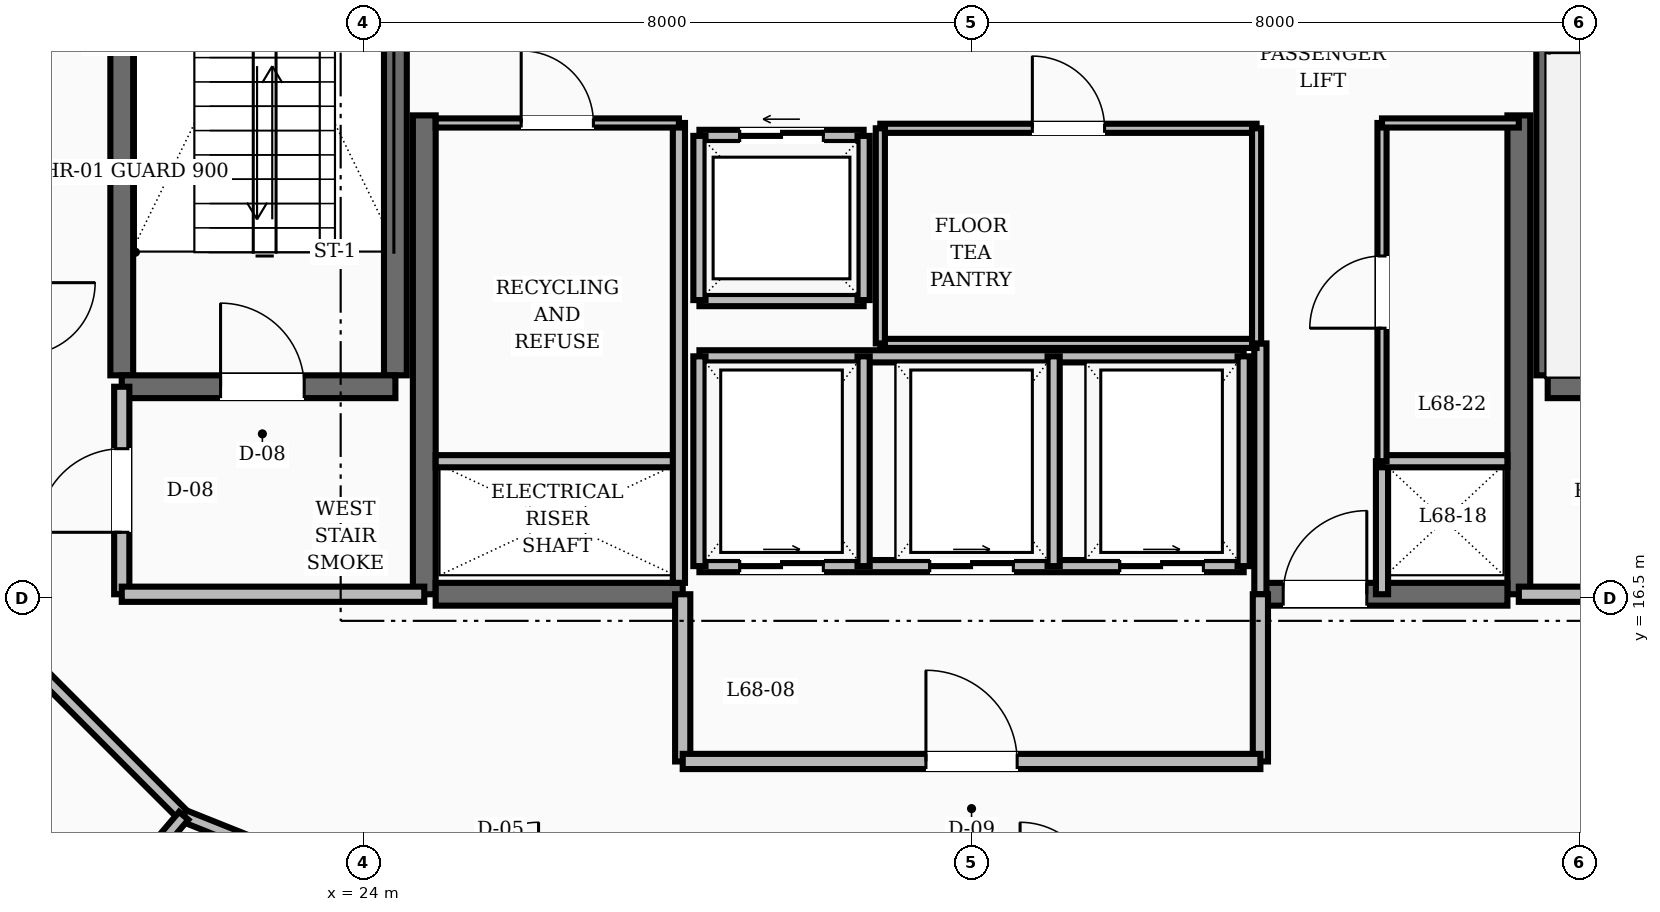
"""IFC4 building model, lengths in metres.
Left out: names, types, materials, properties, quantities, classifications, styles, units other than length and angle.
Written with IfcOpenShell. Run it as: python <this file> out.ifc"""

import sys

from ifc_helpers import new_model, si_unit, direction, frame, frame_2d, origin, place, context, subcontext, project, spatial, rectangle, extrude, element, fill, save


model = new_model("IFC4")
c1 = context("Model", 3, precision=1e-05, world=origin(), true_north=direction((0.0, 1.0)))
c2 = subcontext(c1, "Body", "Model", "MODEL_VIEW")
j1 = project(units=[si_unit("LENGTHUNIT", "METRE"), si_unit("PLANEANGLEUNIT", "RADIAN")], contexts=[c1])
p1 = place(None, origin())
s1 = spatial("IfcSite", under=j1, at=p1, CompositionType="ELEMENT")
p2 = place(p1, origin())
s2 = spatial("IfcBuilding", under=s1, at=p2, CompositionType="ELEMENT")
p3 = place(p2, frame((0.0, 0.0, 261.6)))
s3 = spatial("IfcBuildingStorey", under=s2, at=p3, CompositionType="ELEMENT", Elevation=261.6)
for number, where, z_axis, x_axis in (
    (1, (24.8, 16.55, 0.0), (0.0, 0.0, 1.0), (0.0, 1.0, 0.0)),
    (2, (39.2, 16.55, 0.0), (0.0, 0.0, 1.0), (0.0, 1.0, 0.0)),
):
    element("IfcWall", number, at=place(p3, frame(where, z_axis=z_axis, x_axis=x_axis)), inside=s3, PredefinedType="SHEAR", context=c2, shape_type="SweptSolid", body=[
        extrude(rectangle(XDim=6.3, YDim=0.3, at=frame_2d((3.15, 0.0))), origin(), (0.0, 0.0, 1.0), 3.6),
    ])
p4 = place(p3, frame((24.95, 16.55, 0.0), z_axis=(0.0, 0.0, 1.0), x_axis=(1.0, 0.0, 0.0)))
e3 = element("IfcWall", 3, at=p4, inside=s3, PredefinedType="SHEAR", context=c2, shape_type="SweptSolid", body=[
    extrude(rectangle(XDim=3.25, YDim=0.3, at=frame_2d((1.625, 0.0))), origin(), (0.0, 0.0, 1.0), 3.6),
])
p5 = place(p3, frame((35.8, 16.55, 0.0), z_axis=(0.0, 0.0, 1.0), x_axis=(1.0, 0.0, 0.0)))
e4 = element("IfcWall", 4, at=p5, inside=s3, PredefinedType="SHEAR", context=c2, shape_type="SweptSolid", body=[
    extrude(rectangle(XDim=3.25, YDim=0.3, at=frame_2d((1.625, 0.0))), origin(), (0.0, 0.0, 1.0), 3.6),
])
p6 = place(p5, frame((0.3, 0.0, 0.0)))
e5 = element("IfcOpeningElement", 5, at=p6, cuts=e4, PredefinedType="OPENING", context=c2, shape_type="SweptSolid", body=[
    extrude(rectangle(XDim=1.1, YDim=2.1, at=frame_2d((0.55, 1.05))), frame((0.0, 0.16, 0.0), z_axis=(0.0, -1.0, 0.0), x_axis=(1.0, 0.0, 0.0)), (0.0, 0.0, 1.0), 0.32),
])
for number, where, z_axis, x_axis in (
    (6, (20.82, 19.43, 0.0), (0.0, 0.0, 1.0), (0.0, 1.0, 0.0)),
    (7, (24.42, 19.43, 0.0), (0.0, 0.0, 1.0), (0.0, 1.0, 0.0)),
):
    element("IfcWall", number, at=place(p3, frame(where, z_axis=z_axis, x_axis=x_axis)), inside=s3, PredefinedType="SHEAR", context=c2, shape_type="SweptSolid", body=[
        extrude(rectangle(XDim=8.74, YDim=0.3, at=frame_2d((4.37, 0.0))), origin(), (0.0, 0.0, 1.0), 3.6),
    ])
p7 = place(p3, frame((20.82, 19.28, 0.0), z_axis=(0.0, 0.0, 1.0), x_axis=(1.0, 0.0, 0.0)))
e8 = element("IfcWall", 8, at=p7, inside=s3, PredefinedType="SHEAR", context=c2, shape_type="SweptSolid", body=[
    extrude(rectangle(XDim=3.6, YDim=0.3, at=frame_2d((1.8, 0.0))), origin(), (0.0, 0.0, 1.0), 3.6),
])
p8 = place(p7, frame((1.3, 0.0, 0.0)))
e9 = element("IfcOpeningElement", 9, at=p8, cuts=e8, PredefinedType="OPENING", context=c2, shape_type="SweptSolid", body=[
    extrude(rectangle(XDim=1.1, YDim=2.1, at=frame_2d((0.55, 1.05))), frame((0.0, 0.16, 0.0), z_axis=(0.0, -1.0, 0.0), x_axis=(1.0, 0.0, 0.0)), (0.0, 0.0, 1.0), 0.32),
])
p9 = place(p3, frame((39.58, 19.43, 0.0), z_axis=(0.0, 0.0, 1.0), x_axis=(0.0, 1.0, 0.0)))
e10 = element("IfcWall", 10, at=p9, inside=s3, PredefinedType="SHEAR", context=c2, shape_type="SweptSolid", body=[
    extrude(rectangle(XDim=8.74, YDim=0.3, at=frame_2d((4.37, 0.0))), origin(), (0.0, 0.0, 1.0), 3.6),
])
p10 = place(p3, frame((39.58, 19.28, 0.0), z_axis=(0.0, 0.0, 1.0), x_axis=(1.0, 0.0, 0.0)))
e11 = element("IfcWall", 11, at=p10, inside=s3, PredefinedType="SHEAR", context=c2, shape_type="SweptSolid", body=[
    extrude(rectangle(XDim=3.6, YDim=0.3, at=frame_2d((1.8, 0.0))), origin(), (0.0, 0.0, 1.0), 3.6),
])
p11 = place(p3, frame((20.82, 16.55, 0.0), z_axis=(0.0, 0.0, 1.0), x_axis=(0.0, 1.0, 0.0)))
e12 = element("IfcWall", 12, at=p11, inside=s3, PredefinedType="SOLIDWALL", context=c2, shape_type="SweptSolid", body=[
    extrude(rectangle(XDim=2.73, YDim=0.2, at=frame_2d((1.365, 0.0))), origin(), (0.0, 0.0, 1.0), 2.87),
])
p12 = place(p11, frame((0.815, 0.0, 0.0)))
e13 = element("IfcOpeningElement", 13, at=p12, cuts=e12, PredefinedType="OPENING", context=c2, shape_type="SweptSolid", body=[
    extrude(rectangle(XDim=1.1, YDim=2.1, at=frame_2d((0.55, 1.05))), frame((0.0, 0.11, 0.0), z_axis=(0.0, -1.0, 0.0), x_axis=(1.0, 0.0, 0.0)), (0.0, 0.0, 1.0), 0.22),
])
for number, where, z_axis, x_axis in (
    (14, (20.82, 16.55, 0.0), (0.0, 0.0, 1.0), (1.0, 0.0, 0.0)),
    (15, (39.2, 16.55, 0.0), (0.0, 0.0, 1.0), (1.0, 0.0, 0.0)),
):
    element("IfcWall", number, at=place(p3, frame(where, z_axis=z_axis, x_axis=x_axis)), inside=s3, PredefinedType="SOLIDWALL", context=c2, shape_type="SweptSolid", body=[
        extrude(rectangle(XDim=3.98, YDim=0.2, at=frame_2d((1.99, 0.0))), origin(), (0.0, 0.0, 1.0), 2.87),
    ])
p13 = place(p3, frame((35.8, 16.55, 0.0), z_axis=(0.0, 0.0, 1.0), x_axis=(0.0, 1.0, 0.0)))
e16 = element("IfcWall", 16, at=p13, inside=s3, PredefinedType="SOLIDWALL", context=c2, shape_type="SweptSolid", body=[
    extrude(rectangle(XDim=3.3, YDim=0.16, at=frame_2d((1.65, 0.0))), origin(), (0.0, 0.0, 1.0), 2.87),
])
p14 = place(p3, frame((37.4, 16.55, 0.0), z_axis=(0.0, 0.0, 1.0), x_axis=(0.0, 1.0, 0.0)))
e17 = element("IfcWall", 17, at=p14, inside=s3, PredefinedType="SOLIDWALL", context=c2, shape_type="SweptSolid", body=[
    extrude(rectangle(XDim=1.75, YDim=0.16, at=frame_2d((0.875, 0.0))), origin(), (0.0, 0.0, 1.0), 2.87),
])
for number, where, z_axis, x_axis in (
    (18, (28.2, 14.35, 0.0), (0.0, 0.0, 1.0), (0.0, 1.0, 0.0)),
    (19, (35.8, 14.35, 0.0), (0.0, 0.0, 1.0), (0.0, 1.0, 0.0)),
):
    element("IfcWall", number, at=place(p3, frame(where, z_axis=z_axis, x_axis=x_axis)), inside=s3, PredefinedType="SOLIDWALL", context=c2, shape_type="SweptSolid", body=[
        extrude(rectangle(XDim=2.2, YDim=0.2, at=frame_2d((1.1, 0.0))), origin(), (0.0, 0.0, 1.0), 2.87),
    ])
p15 = place(p3, frame((28.2, 14.35, 0.0), z_axis=(0.0, 0.0, 1.0), x_axis=(1.0, 0.0, 0.0)))
e20 = element("IfcWall", 20, at=p15, inside=s3, PredefinedType="SOLIDWALL", context=c2, shape_type="SweptSolid", body=[
    extrude(rectangle(XDim=7.6, YDim=0.2, at=frame_2d((3.8, 0.0))), origin(), (0.0, 0.0, 1.0), 2.87),
])
p16 = place(p15, frame((3.2, 0.0, 0.0)))
e21 = element("IfcOpeningElement", 21, at=p16, cuts=e20, PredefinedType="OPENING", context=c2, shape_type="SweptSolid", body=[
    extrude(rectangle(XDim=1.2, YDim=2.1, at=frame_2d((0.6, 1.05))), frame((0.0, 0.11, 0.0), z_axis=(0.0, -1.0, 0.0), x_axis=(1.0, 0.0, 0.0)), (0.0, 0.0, 1.0), 0.22),
])
p17 = place(p3, frame((28.42, 22.58, 0.0), z_axis=(0.0, 0.0, 1.0), x_axis=(1.0, 0.0, 0.0)))
e22 = element("IfcWall", 22, at=p17, inside=s3, PredefinedType="SOLIDWALL", context=c2, shape_type="SweptSolid", body=[
    extrude(rectangle(XDim=2.16, YDim=0.16, at=frame_2d((1.08, 0.0))), origin(), (0.0, 0.0, 1.0), 2.87),
])
p18 = place(p17, frame((0.53, 0.0, 0.0)))
e23 = element("IfcOpeningElement", 23, at=p18, cuts=e22, PredefinedType="OPENING", context=c2, shape_type="SweptSolid", body=[
    extrude(rectangle(XDim=1.1, YDim=2.15, at=frame_2d((0.55, 1.075))), frame((0.0, 0.09, 0.0), z_axis=(0.0, -1.0, 0.0), x_axis=(1.0, 0.0, 0.0)), (0.0, 0.0, 1.0), 0.18),
])
for number, where, z_axis, x_axis in (
    (24, (28.42, 20.42, 0.0), (0.0, 0.0, 1.0), (1.0, 0.0, 0.0)),
    (25, (28.42, 20.42, 0.0), (0.0, 0.0, 1.0), (0.0, 1.0, 0.0)),
    (26, (30.58, 20.42, 0.0), (0.0, 0.0, 1.0), (0.0, 1.0, 0.0)),
):
    element("IfcWall", number, at=place(p3, frame(where, z_axis=z_axis, x_axis=x_axis)), inside=s3, PredefinedType="SOLIDWALL", context=c2, shape_type="SweptSolid", body=[
        extrude(rectangle(XDim=2.16, YDim=0.16, at=frame_2d((1.08, 0.0))), origin(), (0.0, 0.0, 1.0), 2.87),
    ])
p19 = place(p3, frame((28.42, 16.92, 0.0), z_axis=(0.0, 0.0, 1.0), x_axis=(1.0, 0.0, 0.0)))
e27 = element("IfcWall", 27, at=p19, inside=s3, PredefinedType="SOLIDWALL", context=c2, shape_type="SweptSolid", body=[
    extrude(rectangle(XDim=7.16, YDim=0.16, at=frame_2d((3.58, 0.0))), origin(), (0.0, 0.0, 1.0), 2.87),
])
p20 = place(p19, frame((0.53, 0.0, 0.0)))
e28 = element("IfcOpeningElement", 28, at=p20, cuts=e27, PredefinedType="OPENING", context=c2, shape_type="SweptSolid", body=[
    extrude(rectangle(XDim=1.1, YDim=2.15, at=frame_2d((0.55, 1.075))), frame((0.0, 0.09, 0.0), z_axis=(0.0, -1.0, 0.0), x_axis=(1.0, 0.0, 0.0)), (0.0, 0.0, 1.0), 0.18),
])
p21 = place(p19, frame((3.03, 0.0, 0.0)))
e29 = element("IfcOpeningElement", 29, at=p21, cuts=e27, PredefinedType="OPENING", context=c2, shape_type="SweptSolid", body=[
    extrude(rectangle(XDim=1.1, YDim=2.15, at=frame_2d((0.55, 1.075))), frame((0.0, 0.09, 0.0), z_axis=(0.0, -1.0, 0.0), x_axis=(1.0, 0.0, 0.0)), (0.0, 0.0, 1.0), 0.18),
])
p22 = place(p19, frame((5.53, 0.0, 0.0)))
e30 = element("IfcOpeningElement", 30, at=p22, cuts=e27, PredefinedType="OPENING", context=c2, shape_type="SweptSolid", body=[
    extrude(rectangle(XDim=1.1, YDim=2.15, at=frame_2d((0.55, 1.075))), frame((0.0, 0.09, 0.0), z_axis=(0.0, -1.0, 0.0), x_axis=(1.0, 0.0, 0.0)), (0.0, 0.0, 1.0), 0.18),
])
p23 = place(p3, frame((28.42, 19.68, 0.0), z_axis=(0.0, 0.0, 1.0), x_axis=(1.0, 0.0, 0.0)))
e31 = element("IfcWall", 31, at=p23, inside=s3, PredefinedType="SOLIDWALL", context=c2, shape_type="SweptSolid", body=[
    extrude(rectangle(XDim=7.16, YDim=0.16, at=frame_2d((3.58, 0.0))), origin(), (0.0, 0.0, 1.0), 2.87),
])
for number, where, z_axis, x_axis in (
    (32, (28.42, 16.92, 0.0), (0.0, 0.0, 1.0), (0.0, 1.0, 0.0)),
    (33, (30.58, 16.92, 0.0), (0.0, 0.0, 1.0), (0.0, 1.0, 0.0)),
    (34, (33.08, 16.92, 0.0), (0.0, 0.0, 1.0), (0.0, 1.0, 0.0)),
    (35, (35.58, 16.92, 0.0), (0.0, 0.0, 1.0), (0.0, 1.0, 0.0)),
):
    element("IfcWall", number, at=place(p3, frame(where, z_axis=z_axis, x_axis=x_axis)), inside=s3, PredefinedType="SOLIDWALL", context=c2, shape_type="SweptSolid", body=[
        extrude(rectangle(XDim=2.76, YDim=0.16, at=frame_2d((1.38, 0.0))), origin(), (0.0, 0.0, 1.0), 2.87),
    ])
p24 = place(p3, frame((30.8, 22.68, 0.0), z_axis=(0.0, 0.0, 1.0), x_axis=(1.0, 0.0, 0.0)))
e36 = element("IfcWall", 36, at=p24, inside=s3, PredefinedType="PARTITIONING", context=c2, shape_type="SweptSolid", body=[
    extrude(rectangle(XDim=4.95, YDim=0.12, at=frame_2d((2.475, 0.0))), origin(), (0.0, 0.0, 1.0), 2.87),
])
p25 = place(p24, frame((2.0, 0.0, 0.0)))
e37 = element("IfcOpeningElement", 37, at=p25, cuts=e36, PredefinedType="OPENING", context=c2, shape_type="SweptSolid", body=[
    extrude(rectangle(XDim=0.95, YDim=2.1, at=frame_2d((0.475, 1.05))), frame((0.0, 0.07, 0.0), z_axis=(0.0, -1.0, 0.0), x_axis=(1.0, 0.0, 0.0)), (0.0, 0.0, 1.0), 0.14),
])
p26 = place(p3, frame((30.8, 19.85, 0.0), z_axis=(0.0, 0.0, 1.0), x_axis=(1.0, 0.0, 0.0)))
e38 = element("IfcWall", 38, at=p26, inside=s3, PredefinedType="PARTITIONING", context=c2, shape_type="SweptSolid", body=[
    extrude(rectangle(XDim=4.95, YDim=0.12, at=frame_2d((2.475, 0.0))), origin(), (0.0, 0.0, 1.0), 2.87),
])
for number, where, z_axis, x_axis in (
    (39, (30.8, 19.85, 0.0), (0.0, 0.0, 1.0), (0.0, 1.0, 0.0)),
    (40, (35.75, 19.85, 0.0), (0.0, 0.0, 1.0), (0.0, 1.0, 0.0)),
):
    element("IfcWall", number, at=place(p3, frame(where, z_axis=z_axis, x_axis=x_axis)), inside=s3, PredefinedType="PARTITIONING", context=c2, shape_type="SweptSolid", body=[
        extrude(rectangle(XDim=2.83, YDim=0.12, at=frame_2d((1.415, 0.0))), origin(), (0.0, 0.0, 1.0), 2.87),
    ])
p27 = place(p3, frame((24.95, 18.3, 0.0), z_axis=(0.0, 0.0, 1.0), x_axis=(1.0, 0.0, 0.0)))
e41 = element("IfcWall", 41, at=p27, inside=s3, PredefinedType="SOLIDWALL", context=c2, shape_type="SweptSolid", body=[
    extrude(rectangle(XDim=3.2, YDim=0.16, at=frame_2d((1.6, 0.0))), origin(), (0.0, 0.0, 1.0), 2.87),
])
p28 = place(p3, frame((28.15, 16.7, 0.0), z_axis=(0.0, 0.0, 1.0), x_axis=(0.0, 1.0, 0.0)))
e42 = element("IfcWall", 42, at=p28, inside=s3, PredefinedType="SOLIDWALL", context=c2, shape_type="SweptSolid", body=[
    extrude(rectangle(XDim=6.05, YDim=0.16, at=frame_2d((3.025, 0.0))), origin(), (0.0, 0.0, 1.0), 2.87),
])
p29 = place(p3, frame((37.4, 18.3, 0.0), z_axis=(0.0, 0.0, 1.0), x_axis=(1.0, 0.0, 0.0)))
e43 = element("IfcWall", 43, at=p29, inside=s3, PredefinedType="SOLIDWALL", context=c2, shape_type="SweptSolid", body=[
    extrude(rectangle(XDim=1.65, YDim=0.16, at=frame_2d((0.825, 0.0))), origin(), (0.0, 0.0, 1.0), 2.87),
])
p30 = place(p3, frame((24.95, 22.75, 0.0), z_axis=(0.0, 0.0, 1.0), x_axis=(1.0, 0.0, 0.0)))
e44 = element("IfcWall", 44, at=p30, inside=s3, PredefinedType="PARTITIONING", context=c2, shape_type="SweptSolid", body=[
    extrude(rectangle(XDim=3.2, YDim=0.12, at=frame_2d((1.6, 0.0))), origin(), (0.0, 0.0, 1.0), 2.87),
])
p31 = place(p30, frame((1.125, 0.0, 0.0)))
e45 = element("IfcOpeningElement", 45, at=p31, cuts=e44, PredefinedType="OPENING", context=c2, shape_type="SweptSolid", body=[
    extrude(rectangle(XDim=0.95, YDim=2.1, at=frame_2d((0.475, 1.05))), frame((0.0, 0.07, 0.0), z_axis=(0.0, -1.0, 0.0), x_axis=(1.0, 0.0, 0.0)), (0.0, 0.0, 1.0), 0.14),
])
p32 = place(p3, frame((37.4, 18.3, 0.0), z_axis=(0.0, 0.0, 1.0), x_axis=(0.0, 1.0, 0.0)))
e46 = element("IfcWall", 46, at=p32, inside=s3, PredefinedType="PARTITIONING", context=c2, shape_type="SweptSolid", body=[
    extrude(rectangle(XDim=4.45, YDim=0.12, at=frame_2d((2.225, 0.0))), origin(), (0.0, 0.0, 1.0), 2.87),
])
p33 = place(p32, frame((1.75, 0.0, 0.0)))
e47 = element("IfcOpeningElement", 47, at=p33, cuts=e46, PredefinedType="OPENING", context=c2, shape_type="SweptSolid", body=[
    extrude(rectangle(XDim=0.95, YDim=2.1, at=frame_2d((0.475, 1.05))), frame((0.0, 0.07, 0.0), z_axis=(0.0, -1.0, 0.0), x_axis=(1.0, 0.0, 0.0)), (0.0, 0.0, 1.0), 0.14),
])
p34 = place(p3, frame((37.4, 22.75, 0.0), z_axis=(0.0, 0.0, 1.0), x_axis=(1.0, 0.0, 0.0)))
e48 = element("IfcWall", 48, at=p34, inside=s3, PredefinedType="PARTITIONING", context=c2, shape_type="SweptSolid", body=[
    extrude(rectangle(XDim=1.8, YDim=0.12, at=frame_2d((0.9, 0.0))), origin(), (0.0, 0.0, 1.0), 2.87),
])
p35 = place(p3, frame((19.573, 15.697, 0.0), z_axis=(0.0, 0.0, 1.0), x_axis=(0.707106781187, -0.707106781187, 0.0)))
e49 = element("IfcWall", 49, at=p35, inside=s3, PredefinedType="SOLIDWALL", context=c2, shape_type="SweptSolid", body=[
    extrude(rectangle(XDim=2.916, YDim=0.16, at=frame_2d((1.458, 0.0))), origin(), (0.0, 0.0, 1.0), 2.87),
])
p36 = place(p3, frame((21.635, 13.635, 0.0), z_axis=(0.0, 0.0, 1.0), x_axis=(0.92856882165, -0.371160266542, 0.0)))
e50 = element("IfcWall", 50, at=p36, inside=s3, PredefinedType="SOLIDWALL", context=c2, shape_type="SweptSolid", body=[
    extrude(rectangle(XDim=2.923, YDim=0.16, at=frame_2d((1.461, 0.0))), origin(), (0.0, 0.0, 1.0), 2.87),
])
p37 = place(p3, frame((39.651, 12.55, 0.0), z_axis=(0.0, 0.0, 1.0), x_axis=(0.92856882165, 0.371160266542, 0.0)))
e51 = element("IfcWall", 51, at=p37, inside=s3, PredefinedType="SOLIDWALL", context=c2, shape_type="SweptSolid", body=[
    extrude(rectangle(XDim=2.923, YDim=0.16, at=frame_2d((1.461, 0.0))), origin(), (0.0, 0.0, 1.0), 2.87),
])
p38 = place(p37, frame((0.987, 0.0, 0.0)))
e52 = element("IfcOpeningElement", 52, at=p38, cuts=e51, PredefinedType="OPENING", context=c2, shape_type="SweptSolid", body=[
    extrude(rectangle(XDim=0.95, YDim=2.1, at=frame_2d((0.475, 1.05))), frame((0.0, 0.09, 0.0), z_axis=(0.0, -1.0, 0.0), x_axis=(1.0, 0.0, 0.0)), (0.0, 0.0, 1.0), 0.18),
])
p39 = place(p3, frame((21.635, 13.635, 0.0), z_axis=(0.0, 0.0, 1.0), x_axis=(-0.648641435067, -0.761094139193, 0.0)))
e53 = element("IfcWall", 53, at=p39, inside=s3, PredefinedType="SOLIDWALL", context=c2, shape_type="SweptSolid", body=[
    extrude(rectangle(XDim=5.899, YDim=0.16, at=frame_2d((2.949, 0.0))), origin(), (0.0, 0.0, 1.0), 2.87),
])
p40 = place(p8, origin())
e54 = element("IfcDoor", 54, at=p40, inside=s3, OperationType="SINGLE_SWING_LEFT", PredefinedType="DOOR", context=c2, shape_type="SweptSolid", body=[
    extrude(rectangle(XDim=1.1, YDim=2.1, at=frame_2d((0.55, 1.05))), frame((0.0, 0.025, 0.0), z_axis=(0.0, -1.0, 0.0), x_axis=(1.0, 0.0, 0.0)), (0.0, 0.0, 1.0), 0.05),
])
fill(e9, e54)
p41 = place(p12, origin())
e55 = element("IfcDoor", 55, at=p41, inside=s3, OperationType="SINGLE_SWING_LEFT", PredefinedType="DOOR", context=c2, shape_type="SweptSolid", body=[
    extrude(rectangle(XDim=1.1, YDim=2.1, at=frame_2d((0.55, 1.05))), frame((0.0, 0.025, 0.0), z_axis=(0.0, -1.0, 0.0), x_axis=(1.0, 0.0, 0.0)), (0.0, 0.0, 1.0), 0.05),
])
fill(e13, e55)
p42 = place(p6, origin())
e56 = element("IfcDoor", 56, at=p42, inside=s3, OperationType="SINGLE_SWING_RIGHT", PredefinedType="DOOR", context=c2, shape_type="SweptSolid", body=[
    extrude(rectangle(XDim=1.1, YDim=2.1, at=frame_2d((0.55, 1.05))), frame((0.0, 0.025, 0.0), z_axis=(0.0, -1.0, 0.0), x_axis=(1.0, 0.0, 0.0)), (0.0, 0.0, 1.0), 0.05),
])
fill(e5, e56)
p43 = place(p16, origin())
e57 = element("IfcDoor", 57, at=p43, inside=s3, OperationType="SINGLE_SWING_LEFT", PredefinedType="DOOR", context=c2, shape_type="SweptSolid", body=[
    extrude(rectangle(XDim=1.2, YDim=2.1, at=frame_2d((0.6, 1.05))), frame((0.0, 0.025, 0.0), z_axis=(0.0, -1.0, 0.0), x_axis=(1.0, 0.0, 0.0)), (0.0, 0.0, 1.0), 0.05),
])
fill(e21, e57)
p44 = place(p18, origin())
e58 = element("IfcDoor", 58, at=p44, inside=s3, OperationType="SLIDING_TO_LEFT", PredefinedType="DOOR", context=c2, shape_type="SweptSolid", body=[
    extrude(rectangle(XDim=1.1, YDim=2.15, at=frame_2d((0.55, 1.075))), frame((0.0, 0.025, 0.0), z_axis=(0.0, -1.0, 0.0), x_axis=(1.0, 0.0, 0.0)), (0.0, 0.0, 1.0), 0.05),
])
fill(e23, e58)
p45 = place(p20, origin())
e59 = element("IfcDoor", 59, at=p45, inside=s3, OperationType="SLIDING_TO_RIGHT", PredefinedType="DOOR", context=c2, shape_type="SweptSolid", body=[
    extrude(rectangle(XDim=1.1, YDim=2.15, at=frame_2d((0.55, 1.075))), frame((0.0, 0.025, 0.0), z_axis=(0.0, -1.0, 0.0), x_axis=(1.0, 0.0, 0.0)), (0.0, 0.0, 1.0), 0.05),
])
fill(e28, e59)
p46 = place(p21, origin())
e60 = element("IfcDoor", 60, at=p46, inside=s3, OperationType="SLIDING_TO_RIGHT", PredefinedType="DOOR", context=c2, shape_type="SweptSolid", body=[
    extrude(rectangle(XDim=1.1, YDim=2.15, at=frame_2d((0.55, 1.075))), frame((0.0, 0.025, 0.0), z_axis=(0.0, -1.0, 0.0), x_axis=(1.0, 0.0, 0.0)), (0.0, 0.0, 1.0), 0.05),
])
fill(e29, e60)
p47 = place(p22, origin())
e61 = element("IfcDoor", 61, at=p47, inside=s3, OperationType="SLIDING_TO_RIGHT", PredefinedType="DOOR", context=c2, shape_type="SweptSolid", body=[
    extrude(rectangle(XDim=1.1, YDim=2.15, at=frame_2d((0.55, 1.075))), frame((0.0, 0.025, 0.0), z_axis=(0.0, -1.0, 0.0), x_axis=(1.0, 0.0, 0.0)), (0.0, 0.0, 1.0), 0.05),
])
fill(e30, e61)
p48 = place(p25, origin())
e62 = element("IfcDoor", 62, at=p48, inside=s3, OperationType="SINGLE_SWING_LEFT", PredefinedType="DOOR", context=c2, shape_type="SweptSolid", body=[
    extrude(rectangle(XDim=0.95, YDim=2.1, at=frame_2d((0.475, 1.05))), frame((0.0, 0.025, 0.0), z_axis=(0.0, -1.0, 0.0), x_axis=(1.0, 0.0, 0.0)), (0.0, 0.0, 1.0), 0.05),
])
fill(e37, e62)
p49 = place(p31, origin())
e63 = element("IfcDoor", 63, at=p49, inside=s3, OperationType="SINGLE_SWING_LEFT", PredefinedType="DOOR", context=c2, shape_type="SweptSolid", body=[
    extrude(rectangle(XDim=0.95, YDim=2.1, at=frame_2d((0.475, 1.05))), frame((0.0, 0.025, 0.0), z_axis=(0.0, -1.0, 0.0), x_axis=(1.0, 0.0, 0.0)), (0.0, 0.0, 1.0), 0.05),
])
fill(e45, e63)
p50 = place(p33, origin())
e64 = element("IfcDoor", 64, at=p50, inside=s3, OperationType="SINGLE_SWING_LEFT", PredefinedType="DOOR", context=c2, shape_type="SweptSolid", body=[
    extrude(rectangle(XDim=0.95, YDim=2.1, at=frame_2d((0.475, 1.05))), frame((0.0, 0.025, 0.0), z_axis=(0.0, -1.0, 0.0), x_axis=(1.0, 0.0, 0.0)), (0.0, 0.0, 1.0), 0.05),
])
fill(e47, e64)
save(model, sys.argv[1])
